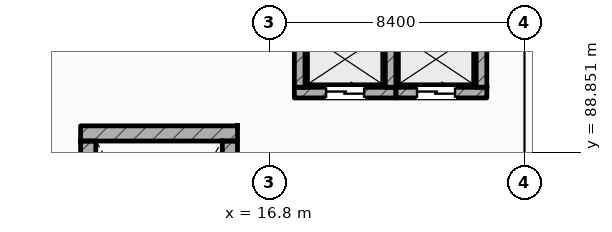
"""IFC4 building model, lengths in metres.
Left out: names, types, materials, properties, quantities, classifications, styles, units other than length and angle.
Written with IfcOpenShell. Run it as: python <this file> out.ifc"""

import sys

from ifc_helpers import new_model, si_unit, direction, frame, frame_2d, origin, place, context, subcontext, project, spatial, rectangle, extrude, element, fill, save


model = new_model("IFC4")
c1 = context("Model", 3, precision=1e-05, world=origin(), true_north=direction((0.0, 1.0)))
c2 = subcontext(c1, "Body", "Model", "MODEL_VIEW")
j1 = project(units=[si_unit("LENGTHUNIT", "METRE"), si_unit("PLANEANGLEUNIT", "RADIAN")], contexts=[c1])
p1 = place(None, origin())
s1 = spatial("IfcSite", under=j1, at=p1, CompositionType="ELEMENT")
p2 = place(p1, origin())
s2 = spatial("IfcBuilding", under=s1, at=p2, CompositionType="ELEMENT")
p3 = place(p2, frame((0.0, 0.0, 11.4)))
s3 = spatial("IfcBuildingStorey", under=s2, at=p3, CompositionType="ELEMENT", Elevation=11.4)
p4 = place(p3, frame((10.6, 89.462, 0.0), z_axis=(0.0, 0.0, 1.0), x_axis=(1.0, 0.0, 0.0)))
e1 = element("IfcWall", 1, at=p4, inside=s3, PredefinedType="SHEAR", context=c2, shape_type="SweptSolid", body=[
    extrude(rectangle(XDim=5.16, YDim=0.5, at=frame_2d((2.58, 0.0))), origin(), (0.0, 0.0, 1.0), 4.8),
])
p5 = place(p3, frame((10.85, 80.1, 0.0), z_axis=(0.0, 0.0, 1.0), x_axis=(0.0, 1.0, 0.0)))
e2 = element("IfcWall", 2, at=p5, inside=s3, PredefinedType="SHEAR", context=c2, shape_type="SweptSolid", body=[
    extrude(rectangle(XDim=9.112, YDim=0.5, at=frame_2d((4.556, 0.0))), origin(), (0.0, 0.0, 1.0), 4.8),
])
p6 = place(p3, frame((15.51, 80.1, 0.0), z_axis=(0.0, 0.0, 1.0), x_axis=(0.0, 1.0, 0.0)))
e3 = element("IfcWall", 3, at=p6, inside=s3, PredefinedType="SHEAR", context=c2, shape_type="SweptSolid", body=[
    extrude(rectangle(XDim=9.112, YDim=0.5, at=frame_2d((4.556, 0.0))), origin(), (0.0, 0.0, 1.0), 4.8),
])
p7 = place(p6, frame((0.44, 0.0, 0.0)))
e4 = element("IfcOpeningElement", 4, at=p7, cuts=e3, PredefinedType="OPENING", context=c2, shape_type="SweptSolid", body=[
    extrude(rectangle(XDim=1.1, YDim=2.2, at=frame_2d((0.55, 1.1))), frame((0.0, 0.26, 0.0), z_axis=(0.0, -1.0, 0.0), x_axis=(1.0, 0.0, 0.0)), (0.0, 0.0, 1.0), 0.52),
])
p8 = place(p3, frame((17.63, 90.805, 0.0), z_axis=(0.0, 0.0, 1.0), x_axis=(1.0, 0.0, 0.0)))
e5 = element("IfcWall", 5, at=p8, inside=s3, PredefinedType="SHEAR", context=c2, shape_type="SweptSolid", body=[
    extrude(rectangle(XDim=3.34, YDim=0.35, at=frame_2d((1.67, 0.0))), origin(), (0.0, 0.0, 1.0), 4.52),
])
p9 = place(p8, frame((1.045, 0.0, 0.0)))
e6 = element("IfcOpeningElement", 6, at=p9, cuts=e5, PredefinedType="OPENING", context=c2, shape_type="SweptSolid", body=[
    extrude(rectangle(XDim=1.25, YDim=2.25, at=frame_2d((0.625, 1.125))), frame((0.0, 0.185, 0.0), z_axis=(0.0, -1.0, 0.0), x_axis=(1.0, 0.0, 0.0)), (0.0, 0.0, 1.0), 0.37),
])
for number, where, z_axis, x_axis in (
    (7, (17.805, 90.98, 0.0), (0.0, 0.0, 1.0), (0.0, 1.0, 0.0)),
    (8, (20.795, 90.98, 0.0), (0.0, 0.0, 1.0), (0.0, 1.0, 0.0)),
):
    element("IfcWall", number, at=place(p3, frame(where, z_axis=z_axis, x_axis=x_axis)), inside=s3, PredefinedType="SHEAR", context=c2, shape_type="SweptSolid", body=[
        extrude(rectangle(XDim=1.84, YDim=0.35, at=frame_2d((0.92, 0.0))), origin(), (0.0, 0.0, 1.0), 4.52),
    ])
p10 = place(p3, frame((20.97, 90.805, 0.0), z_axis=(0.0, 0.0, 1.0), x_axis=(1.0, 0.0, 0.0)))
e9 = element("IfcWall", 9, at=p10, inside=s3, PredefinedType="SHEAR", context=c2, shape_type="SweptSolid", body=[
    extrude(rectangle(XDim=2.99, YDim=0.35, at=frame_2d((1.495, 0.0))), origin(), (0.0, 0.0, 1.0), 4.52),
])
p11 = place(p10, frame((0.695, 0.0, 0.0)))
e10 = element("IfcOpeningElement", 10, at=p11, cuts=e9, PredefinedType="OPENING", context=c2, shape_type="SweptSolid", body=[
    extrude(rectangle(XDim=1.25, YDim=2.25, at=frame_2d((0.625, 1.125))), frame((0.0, 0.185, 0.0), z_axis=(0.0, -1.0, 0.0), x_axis=(1.0, 0.0, 0.0)), (0.0, 0.0, 1.0), 0.37),
])
p12 = place(p3, frame((23.785, 90.98, 0.0), z_axis=(0.0, 0.0, 1.0), x_axis=(0.0, 1.0, 0.0)))
e11 = element("IfcWall", 11, at=p12, inside=s3, PredefinedType="SHEAR", context=c2, shape_type="SweptSolid", body=[
    extrude(rectangle(XDim=1.84, YDim=0.35, at=frame_2d((0.92, 0.0))), origin(), (0.0, 0.0, 1.0), 4.52),
])
p13 = place(p9, origin())
e12 = element("IfcDoor", 12, at=p13, inside=s3, OperationType="SLIDING_TO_LEFT", PredefinedType="DOOR", context=c2, shape_type="SweptSolid", body=[
    extrude(rectangle(XDim=1.25, YDim=2.25, at=frame_2d((0.625, 1.125))), frame((0.0, 0.025, 0.0), z_axis=(0.0, -1.0, 0.0), x_axis=(1.0, 0.0, 0.0)), (0.0, 0.0, 1.0), 0.05),
])
fill(e6, e12)
p14 = place(p11, origin())
e13 = element("IfcDoor", 13, at=p14, inside=s3, OperationType="SLIDING_TO_LEFT", PredefinedType="DOOR", context=c2, shape_type="SweptSolid", body=[
    extrude(rectangle(XDim=1.25, YDim=2.25, at=frame_2d((0.625, 1.125))), frame((0.0, 0.025, 0.0), z_axis=(0.0, -1.0, 0.0), x_axis=(1.0, 0.0, 0.0)), (0.0, 0.0, 1.0), 0.05),
])
fill(e10, e13)
save(model, sys.argv[1])
